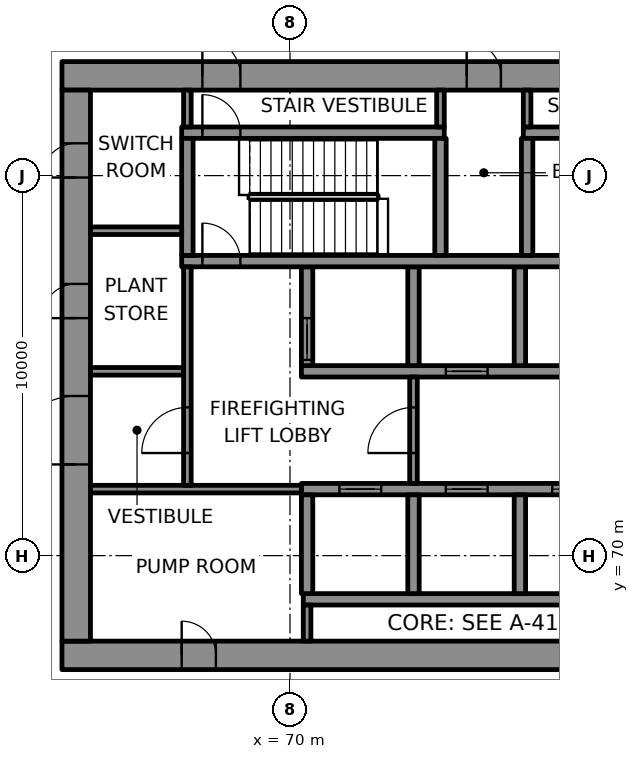
"""IFC4 building model, lengths in metres.
Left out: names, types, materials, properties, quantities, classifications, styles, units other than length and angle.
Written with IfcOpenShell. Run it as: python <this file> out.ifc"""

import sys

from ifc_helpers import new_model, si_unit, direction, frame, frame_2d, origin, place, context, subcontext, project, spatial, rectangle, extrude, element, fill, save


model = new_model("IFC4")
c1 = context("Model", 3, precision=1e-05, world=origin(), true_north=direction((0.0, 1.0)))
c2 = subcontext(c1, "Body", "Model", "MODEL_VIEW")
j1 = project(units=[si_unit("LENGTHUNIT", "METRE"), si_unit("PLANEANGLEUNIT", "RADIAN")], contexts=[c1])
p1 = place(None, origin())
s1 = spatial("IfcSite", under=j1, at=p1, CompositionType="ELEMENT")
p2 = place(p1, origin())
s2 = spatial("IfcBuilding", under=s1, at=p2, CompositionType="ELEMENT")
p3 = place(p2, frame((0.0, 0.0, 146.8)))
s3 = spatial("IfcBuildingStorey", under=s2, at=p3, CompositionType="ELEMENT", Elevation=146.8)
p4 = place(p3, frame((64.0, 67.375, 0.0), z_axis=(0.0, 0.0, 1.0), x_axis=(1.0, 0.0, 0.0)))
e1 = element("IfcWall", 1, at=p4, inside=s3, PredefinedType="SHEAR", context=c2, shape_type="SweptSolid", body=[
    extrude(rectangle(XDim=22.0, YDim=0.75, at=frame_2d((11.0, 0.0))), origin(), (0.0, 0.0, 1.0), 4.05),
])
p5 = place(p4, frame((3.15, 0.0, 0.0)))
e2 = element("IfcOpeningElement", 2, at=p5, cuts=e1, PredefinedType="OPENING", context=c2, shape_type="SweptSolid", body=[
    extrude(rectangle(XDim=0.9, YDim=2.1, at=frame_2d((0.45, 1.05))), frame((0.0, 0.385, 0.0), z_axis=(0.0, -1.0, 0.0), x_axis=(1.0, 0.0, 0.0)), (0.0, 0.0, 1.0), 0.77),
])
p6 = place(p3, frame((64.0, 82.625, 0.0), z_axis=(0.0, 0.0, 1.0), x_axis=(1.0, 0.0, 0.0)))
e3 = element("IfcWall", 3, at=p6, inside=s3, PredefinedType="SHEAR", context=c2, shape_type="SweptSolid", body=[
    extrude(rectangle(XDim=22.0, YDim=0.75, at=frame_2d((11.0, 0.0))), origin(), (0.0, 0.0, 1.0), 4.05),
])
p7 = place(p6, frame((3.695, 0.0, 0.0)))
e4 = element("IfcOpeningElement", 4, at=p7, cuts=e3, PredefinedType="OPENING", context=c2, shape_type="SweptSolid", body=[
    extrude(rectangle(XDim=1.0, YDim=2.1, at=frame_2d((0.5, 1.05))), frame((0.0, 0.385, 0.0), z_axis=(0.0, -1.0, 0.0), x_axis=(1.0, 0.0, 0.0)), (0.0, 0.0, 1.0), 0.77),
])
p8 = place(p6, frame((17.505, 0.0, 0.0)))
e5 = element("IfcOpeningElement", 5, at=p8, cuts=e3, PredefinedType="OPENING", context=c2, shape_type="SweptSolid", body=[
    extrude(rectangle(XDim=1.0, YDim=2.1, at=frame_2d((0.5, 1.05))), frame((0.0, 0.385, 0.0), z_axis=(0.0, -1.0, 0.0), x_axis=(1.0, 0.0, 0.0)), (0.0, 0.0, 1.0), 0.77),
])
p9 = place(p6, frame((10.65, 0.0, 0.0)))
e6 = element("IfcOpeningElement", 6, at=p9, cuts=e3, PredefinedType="OPENING", context=c2, shape_type="SweptSolid", body=[
    extrude(rectangle(XDim=0.9, YDim=2.1, at=frame_2d((0.45, 1.05))), frame((0.0, 0.385, 0.0), z_axis=(0.0, -1.0, 0.0), x_axis=(1.0, 0.0, 0.0)), (0.0, 0.0, 1.0), 0.77),
])
p10 = place(p3, frame((64.375, 67.75, 0.0), z_axis=(0.0, 0.0, 1.0), x_axis=(0.0, 1.0, 0.0)))
e7 = element("IfcWall", 7, at=p10, inside=s3, PredefinedType="SHEAR", context=c2, shape_type="SweptSolid", body=[
    extrude(rectangle(XDim=14.5, YDim=0.75, at=frame_2d((7.25, 0.0))), origin(), (0.0, 0.0, 1.0), 4.05),
])
p11 = place(p10, frame((4.65, 0.0, 0.0)))
e8 = element("IfcOpeningElement", 8, at=p11, cuts=e7, PredefinedType="OPENING", context=c2, shape_type="SweptSolid", body=[
    extrude(rectangle(XDim=1.8, YDim=2.1, at=frame_2d((0.9, 1.05))), frame((0.0, 0.385, 0.0), z_axis=(0.0, -1.0, 0.0), x_axis=(1.0, 0.0, 0.0)), (0.0, 0.0, 1.0), 0.77),
])
p12 = place(p10, frame((8.5, 0.0, 0.0)))
e9 = element("IfcOpeningElement", 9, at=p12, cuts=e7, PredefinedType="OPENING", context=c2, shape_type="SweptSolid", body=[
    extrude(rectangle(XDim=0.9, YDim=2.1, at=frame_2d((0.45, 1.05))), frame((0.0, 0.385, 0.0), z_axis=(0.0, -1.0, 0.0), x_axis=(1.0, 0.0, 0.0)), (0.0, 0.0, 1.0), 0.77),
])
p13 = place(p10, frame((12.2, 0.0, 0.0)))
e10 = element("IfcOpeningElement", 10, at=p13, cuts=e7, PredefinedType="OPENING", context=c2, shape_type="SweptSolid", body=[
    extrude(rectangle(XDim=0.9, YDim=2.1, at=frame_2d((0.45, 1.05))), frame((0.0, 0.385, 0.0), z_axis=(0.0, -1.0, 0.0), x_axis=(1.0, 0.0, 0.0)), (0.0, 0.0, 1.0), 0.77),
])
p14 = place(p3, frame((70.35, 68.85, 0.0), z_axis=(0.0, 0.0, 1.0), x_axis=(1.0, 0.0, 0.0)))
e11 = element("IfcWall", 11, at=p14, inside=s3, PredefinedType="SHEAR", context=c2, shape_type="SweptSolid", body=[
    extrude(rectangle(XDim=14.2, YDim=0.3, at=frame_2d((7.1, 0.0))), origin(), (0.0, 0.0, 1.0), 4.05),
])
p15 = place(p3, frame((70.3, 71.75, 0.0), z_axis=(0.0, 0.0, 1.0), x_axis=(1.0, 0.0, 0.0)))
e12 = element("IfcWall", 12, at=p15, inside=s3, PredefinedType="SHEAR", context=c2, shape_type="SweptSolid", body=[
    extrude(rectangle(XDim=14.3, YDim=0.3, at=frame_2d((7.15, 0.0))), origin(), (0.0, 0.0, 1.0), 4.05),
])
p16 = place(p15, frame((1.0, 0.0, 0.0)))
e13 = element("IfcOpeningElement", 13, at=p16, cuts=e12, PredefinedType="OPENING", context=c2, shape_type="SweptSolid", body=[
    extrude(rectangle(XDim=1.1, YDim=2.1, at=frame_2d((0.55, 1.05))), frame((0.0, 0.16, 0.0), z_axis=(0.0, -1.0, 0.0), x_axis=(1.0, 0.0, 0.0)), (0.0, 0.0, 1.0), 0.32),
])
p17 = place(p15, frame((3.8, 0.0, 0.0)))
e14 = element("IfcOpeningElement", 14, at=p17, cuts=e12, PredefinedType="OPENING", context=c2, shape_type="SweptSolid", body=[
    extrude(rectangle(XDim=1.1, YDim=2.1, at=frame_2d((0.55, 1.05))), frame((0.0, 0.16, 0.0), z_axis=(0.0, -1.0, 0.0), x_axis=(1.0, 0.0, 0.0)), (0.0, 0.0, 1.0), 0.32),
])
p18 = place(p15, frame((6.6, 0.0, 0.0)))
e15 = element("IfcOpeningElement", 15, at=p18, cuts=e12, PredefinedType="OPENING", context=c2, shape_type="SweptSolid", body=[
    extrude(rectangle(XDim=1.1, YDim=2.1, at=frame_2d((0.55, 1.05))), frame((0.0, 0.16, 0.0), z_axis=(0.0, -1.0, 0.0), x_axis=(1.0, 0.0, 0.0)), (0.0, 0.0, 1.0), 0.32),
])
p19 = place(p15, frame((9.4, 0.0, 0.0)))
e16 = element("IfcOpeningElement", 16, at=p19, cuts=e12, PredefinedType="OPENING", context=c2, shape_type="SweptSolid", body=[
    extrude(rectangle(XDim=1.1, YDim=2.1, at=frame_2d((0.55, 1.05))), frame((0.0, 0.16, 0.0), z_axis=(0.0, -1.0, 0.0), x_axis=(1.0, 0.0, 0.0)), (0.0, 0.0, 1.0), 0.32),
])
p20 = place(p15, frame((12.2, 0.0, 0.0)))
e17 = element("IfcOpeningElement", 17, at=p20, cuts=e12, PredefinedType="OPENING", context=c2, shape_type="SweptSolid", body=[
    extrude(rectangle(XDim=1.1, YDim=2.1, at=frame_2d((0.55, 1.05))), frame((0.0, 0.16, 0.0), z_axis=(0.0, -1.0, 0.0), x_axis=(1.0, 0.0, 0.0)), (0.0, 0.0, 1.0), 0.32),
])
p21 = place(p3, frame((70.3, 74.85, 0.0), z_axis=(0.0, 0.0, 1.0), x_axis=(1.0, 0.0, 0.0)))
e18 = element("IfcWall", 18, at=p21, inside=s3, PredefinedType="SHEAR", context=c2, shape_type="SweptSolid", body=[
    extrude(rectangle(XDim=14.3, YDim=0.3, at=frame_2d((7.15, 0.0))), origin(), (0.0, 0.0, 1.0), 4.05),
])
p22 = place(p21, frame((3.8, 0.0, 0.0)))
e19 = element("IfcOpeningElement", 19, at=p22, cuts=e18, PredefinedType="OPENING", context=c2, shape_type="SweptSolid", body=[
    extrude(rectangle(XDim=1.1, YDim=2.1, at=frame_2d((0.55, 1.05))), frame((0.0, 0.16, 0.0), z_axis=(0.0, -1.0, 0.0), x_axis=(1.0, 0.0, 0.0)), (0.0, 0.0, 1.0), 0.32),
])
p23 = place(p21, frame((12.2, 0.0, 0.0)))
e20 = element("IfcOpeningElement", 20, at=p23, cuts=e18, PredefinedType="OPENING", context=c2, shape_type="SweptSolid", body=[
    extrude(rectangle(XDim=1.1, YDim=2.1, at=frame_2d((0.55, 1.05))), frame((0.0, 0.16, 0.0), z_axis=(0.0, -1.0, 0.0), x_axis=(1.0, 0.0, 0.0)), (0.0, 0.0, 1.0), 0.32),
])
p24 = place(p3, frame((70.45, 69.0, 0.0), z_axis=(0.0, 0.0, 1.0), x_axis=(0.0, 1.0, 0.0)))
e21 = element("IfcWall", 21, at=p24, inside=s3, PredefinedType="SHEAR", context=c2, shape_type="SweptSolid", body=[
    extrude(rectangle(XDim=2.6, YDim=0.3, at=frame_2d((1.3, 0.0))), origin(), (0.0, 0.0, 1.0), 4.05),
])
p25 = place(p3, frame((70.45, 75.0, 0.0), z_axis=(0.0, 0.0, 1.0), x_axis=(0.0, 1.0, 0.0)))
e22 = element("IfcWall", 22, at=p25, inside=s3, PredefinedType="SHEAR", context=c2, shape_type="SweptSolid", body=[
    extrude(rectangle(XDim=2.6, YDim=0.3, at=frame_2d((1.3, 0.0))), origin(), (0.0, 0.0, 1.0), 4.05),
])
p26 = place(p25, frame((0.15, 0.0, 0.0)))
e23 = element("IfcOpeningElement", 23, at=p26, cuts=e22, PredefinedType="OPENING", context=c2, shape_type="SweptSolid", body=[
    extrude(rectangle(XDim=1.1, YDim=2.1, at=frame_2d((0.55, 1.05))), frame((0.0, 0.16, 0.0), z_axis=(0.0, -1.0, 0.0), x_axis=(1.0, 0.0, 0.0)), (0.0, 0.0, 1.0), 0.32),
])
for number, where, z_axis, x_axis in (
    (24, (73.25, 69.0, 0.0), (0.0, 0.0, 1.0), (0.0, 1.0, 0.0)),
    (25, (73.25, 75.0, 0.0), (0.0, 0.0, 1.0), (0.0, 1.0, 0.0)),
    (26, (76.05, 69.0, 0.0), (0.0, 0.0, 1.0), (0.0, 1.0, 0.0)),
    (27, (76.05, 75.0, 0.0), (0.0, 0.0, 1.0), (0.0, 1.0, 0.0)),
):
    element("IfcWall", number, at=place(p3, frame(where, z_axis=z_axis, x_axis=x_axis)), inside=s3, PredefinedType="SHEAR", context=c2, shape_type="SweptSolid", body=[
        extrude(rectangle(XDim=2.6, YDim=0.3, at=frame_2d((1.3, 0.0))), origin(), (0.0, 0.0, 1.0), 4.05),
    ])
p27 = place(p3, frame((67.15, 77.75, 0.0), z_axis=(0.0, 0.0, 1.0), x_axis=(1.0, 0.0, 0.0)))
e28 = element("IfcWall", 28, at=p27, inside=s3, PredefinedType="SHEAR", context=c2, shape_type="SweptSolid", body=[
    extrude(rectangle(XDim=17.45, YDim=0.3, at=frame_2d((8.725, 0.0))), origin(), (0.0, 0.0, 1.0), 4.05),
])
p28 = place(p27, frame((0.545, 0.0, 0.0)))
e29 = element("IfcOpeningElement", 29, at=p28, cuts=e28, PredefinedType="OPENING", context=c2, shape_type="SweptSolid", body=[
    extrude(rectangle(XDim=1.0, YDim=2.1, at=frame_2d((0.5, 1.05))), frame((0.0, 0.16, 0.0), z_axis=(0.0, -1.0, 0.0), x_axis=(1.0, 0.0, 0.0)), (0.0, 0.0, 1.0), 0.32),
])
p29 = place(p3, frame((67.15, 81.13, 0.0), z_axis=(0.0, 0.0, 1.0), x_axis=(1.0, 0.0, 0.0)))
e30 = element("IfcWall", 30, at=p29, inside=s3, PredefinedType="SHEAR", context=c2, shape_type="SweptSolid", body=[
    extrude(rectangle(XDim=6.91, YDim=0.3, at=frame_2d((3.455, 0.0))), origin(), (0.0, 0.0, 1.0), 4.05),
])
p30 = place(p29, frame((0.545, 0.0, 0.0)))
e31 = element("IfcOpeningElement", 31, at=p30, cuts=e30, PredefinedType="OPENING", context=c2, shape_type="SweptSolid", body=[
    extrude(rectangle(XDim=1.0, YDim=2.1, at=frame_2d((0.5, 1.05))), frame((0.0, 0.16, 0.0), z_axis=(0.0, -1.0, 0.0), x_axis=(1.0, 0.0, 0.0)), (0.0, 0.0, 1.0), 0.32),
])
p31 = place(p3, frame((76.14, 81.13, 0.0), z_axis=(0.0, 0.0, 1.0), x_axis=(1.0, 0.0, 0.0)))
e32 = element("IfcWall", 32, at=p31, inside=s3, PredefinedType="SHEAR", context=c2, shape_type="SweptSolid", body=[
    extrude(rectangle(XDim=6.86, YDim=0.3, at=frame_2d((3.43, 0.0))), origin(), (0.0, 0.0, 1.0), 4.05),
])
p32 = place(p31, frame((5.365, 0.0, 0.0)))
e33 = element("IfcOpeningElement", 33, at=p32, cuts=e32, PredefinedType="OPENING", context=c2, shape_type="SweptSolid", body=[
    extrude(rectangle(XDim=1.0, YDim=2.1, at=frame_2d((0.5, 1.05))), frame((0.0, 0.16, 0.0), z_axis=(0.0, -1.0, 0.0), x_axis=(1.0, 0.0, 0.0)), (0.0, 0.0, 1.0), 0.32),
])
for number, where, z_axis, x_axis in (
    (34, (67.3, 77.9, 0.0), (0.0, 0.0, 1.0), (0.0, 1.0, 0.0)),
    (35, (73.96, 77.9, 0.0), (0.0, 0.0, 1.0), (0.0, 1.0, 0.0)),
    (36, (76.24, 77.9, 0.0), (0.0, 0.0, 1.0), (0.0, 1.0, 0.0)),
):
    element("IfcWall", number, at=place(p3, frame(where, z_axis=z_axis, x_axis=x_axis)), inside=s3, PredefinedType="SHEAR", context=c2, shape_type="SweptSolid", body=[
        extrude(rectangle(XDim=3.08, YDim=0.3, at=frame_2d((1.54, 0.0))), origin(), (0.0, 0.0, 1.0), 4.05),
    ])
p33 = place(p3, frame((71.348, 108.98, 0.0), z_axis=(0.0, 0.0, 1.0), x_axis=(-0.500000383388, -0.866025182435, 0.0)))
e37 = element("IfcWall", 37, at=p33, inside=s3, PredefinedType="SOLIDWALL", context=c2, shape_type="SweptSolid", body=[
    extrude(rectangle(XDim=55.204, YDim=0.3, at=frame_2d((27.602, 0.0))), origin(), (0.0, 0.0, 1.0), 4.05),
])
p34 = place(p33, frame((16.895, 0.0, 0.8)))
e38 = element("IfcOpeningElement", 38, at=p34, cuts=e37, PredefinedType="OPENING", context=c2, shape_type="SweptSolid", body=[
    extrude(rectangle(XDim=3.0, YDim=2.4, at=frame_2d((1.5, 1.2))), frame((0.0, 0.16, 0.0), z_axis=(0.0, -1.0, 0.0), x_axis=(1.0, 0.0, 0.0)), (0.0, 0.0, 1.0), 0.32),
])
p35 = place(p33, frame((35.309, 0.0, 0.8)))
e39 = element("IfcOpeningElement", 39, at=p35, cuts=e37, PredefinedType="OPENING", context=c2, shape_type="SweptSolid", body=[
    extrude(rectangle(XDim=3.0, YDim=2.4, at=frame_2d((1.5, 1.2))), frame((0.0, 0.16, 0.0), z_axis=(0.0, -1.0, 0.0), x_axis=(1.0, 0.0, 0.0)), (0.0, 0.0, 1.0), 0.32),
])
p36 = place(p3, frame((64.75, 71.75, 0.0), z_axis=(0.0, 0.0, 1.0), x_axis=(1.0, 0.0, 0.0)))
e40 = element("IfcWall", 40, at=p36, inside=s3, PredefinedType="PARTITIONING", context=c2, shape_type="SweptSolid", body=[
    extrude(rectangle(XDim=5.55, YDim=0.2, at=frame_2d((2.775, 0.0))), origin(), (0.0, 0.0, 1.0), 4.05),
])
p37 = place(p3, frame((64.75, 74.85, 0.0), z_axis=(0.0, 0.0, 1.0), x_axis=(1.0, 0.0, 0.0)))
e41 = element("IfcWall", 41, at=p37, inside=s3, PredefinedType="PARTITIONING", context=c2, shape_type="SweptSolid", body=[
    extrude(rectangle(XDim=2.45, YDim=0.2, at=frame_2d((1.225, 0.0))), origin(), (0.0, 0.0, 1.0), 4.05),
])
p38 = place(p3, frame((64.75, 78.55, 0.0), z_axis=(0.0, 0.0, 1.0), x_axis=(1.0, 0.0, 0.0)))
e42 = element("IfcWall", 42, at=p38, inside=s3, PredefinedType="PARTITIONING", context=c2, shape_type="SweptSolid", body=[
    extrude(rectangle(XDim=2.4, YDim=0.2, at=frame_2d((1.2, 0.0))), origin(), (0.0, 0.0, 1.0), 4.05),
])
p39 = place(p3, frame((67.3, 71.85, 0.0), z_axis=(0.0, 0.0, 1.0), x_axis=(0.0, 1.0, 0.0)))
e43 = element("IfcWall", 43, at=p39, inside=s3, PredefinedType="PARTITIONING", context=c2, shape_type="SweptSolid", body=[
    extrude(rectangle(XDim=5.75, YDim=0.2, at=frame_2d((2.875, 0.0))), origin(), (0.0, 0.0, 1.0), 4.05),
])
p40 = place(p39, frame((0.85, 0.0, 0.0)))
e44 = element("IfcOpeningElement", 44, at=p40, cuts=e43, PredefinedType="OPENING", context=c2, shape_type="SweptSolid", body=[
    extrude(rectangle(XDim=1.2, YDim=2.1, at=frame_2d((0.6, 1.05))), frame((0.0, 0.11, 0.0), z_axis=(0.0, -1.0, 0.0), x_axis=(1.0, 0.0, 0.0)), (0.0, 0.0, 1.0), 0.22),
])
p41 = place(p3, frame((67.3, 81.28, 0.0), z_axis=(0.0, 0.0, 1.0), x_axis=(0.0, 1.0, 0.0)))
e45 = element("IfcWall", 45, at=p41, inside=s3, PredefinedType="PARTITIONING", context=c2, shape_type="SweptSolid", body=[
    extrude(rectangle(XDim=0.97, YDim=0.2, at=frame_2d((0.485, 0.0))), origin(), (0.0, 0.0, 1.0), 4.05),
])
p42 = place(p3, frame((70.45, 67.75, 0.0), z_axis=(0.0, 0.0, 1.0), x_axis=(0.0, 1.0, 0.0)))
e46 = element("IfcWall", 46, at=p42, inside=s3, PredefinedType="PARTITIONING", context=c2, shape_type="SweptSolid", body=[
    extrude(rectangle(XDim=0.95, YDim=0.2, at=frame_2d((0.475, 0.0))), origin(), (0.0, 0.0, 1.0), 4.05),
])
p43 = place(p3, frame((73.25, 71.9, 0.0), z_axis=(0.0, 0.0, 1.0), x_axis=(0.0, 1.0, 0.0)))
e47 = element("IfcWall", 47, at=p43, inside=s3, PredefinedType="PARTITIONING", context=c2, shape_type="SweptSolid", body=[
    extrude(rectangle(XDim=2.8, YDim=0.2, at=frame_2d((1.4, 0.0))), origin(), (0.0, 0.0, 1.0), 4.05),
])
p44 = place(p43, frame((0.8, 0.0, 0.0)))
e48 = element("IfcOpeningElement", 48, at=p44, cuts=e47, PredefinedType="OPENING", context=c2, shape_type="SweptSolid", body=[
    extrude(rectangle(XDim=1.2, YDim=2.1, at=frame_2d((0.6, 1.05))), frame((0.0, 0.11, 0.0), z_axis=(0.0, -1.0, 0.0), x_axis=(1.0, 0.0, 0.0)), (0.0, 0.0, 1.0), 0.22),
])
for number, where, z_axis, x_axis in (
    (49, (73.96, 81.28, 0.0), (0.0, 0.0, 1.0), (0.0, 1.0, 0.0)),
    (50, (76.24, 81.28, 0.0), (0.0, 0.0, 1.0), (0.0, 1.0, 0.0)),
):
    element("IfcWall", number, at=place(p3, frame(where, z_axis=z_axis, x_axis=x_axis)), inside=s3, PredefinedType="PARTITIONING", context=c2, shape_type="SweptSolid", body=[
        extrude(rectangle(XDim=0.97, YDim=0.2, at=frame_2d((0.485, 0.0))), origin(), (0.0, 0.0, 1.0), 4.05),
    ])
p45 = place(p16, origin())
e51 = element("IfcDoor", 51, at=p45, inside=s3, OperationType="DOUBLE_DOOR_SLIDING", PredefinedType="DOOR", context=c2, shape_type="SweptSolid", body=[
    extrude(rectangle(XDim=1.1, YDim=2.1, at=frame_2d((0.55, 1.05))), frame((0.0, 0.025, 0.0), z_axis=(0.0, -1.0, 0.0), x_axis=(1.0, 0.0, 0.0)), (0.0, 0.0, 1.0), 0.05),
])
fill(e13, e51)
p46 = place(p17, origin())
e52 = element("IfcDoor", 52, at=p46, inside=s3, OperationType="DOUBLE_DOOR_SLIDING", PredefinedType="DOOR", context=c2, shape_type="SweptSolid", body=[
    extrude(rectangle(XDim=1.1, YDim=2.1, at=frame_2d((0.55, 1.05))), frame((0.0, 0.025, 0.0), z_axis=(0.0, -1.0, 0.0), x_axis=(1.0, 0.0, 0.0)), (0.0, 0.0, 1.0), 0.05),
])
fill(e14, e52)
p47 = place(p18, origin())
e53 = element("IfcDoor", 53, at=p47, inside=s3, OperationType="DOUBLE_DOOR_SLIDING", PredefinedType="DOOR", context=c2, shape_type="SweptSolid", body=[
    extrude(rectangle(XDim=1.1, YDim=2.1, at=frame_2d((0.55, 1.05))), frame((0.0, 0.025, 0.0), z_axis=(0.0, -1.0, 0.0), x_axis=(1.0, 0.0, 0.0)), (0.0, 0.0, 1.0), 0.05),
])
fill(e15, e53)
p48 = place(p26, origin())
e54 = element("IfcDoor", 54, at=p48, inside=s3, OperationType="DOUBLE_DOOR_SLIDING", PredefinedType="DOOR", context=c2, shape_type="SweptSolid", body=[
    extrude(rectangle(XDim=1.1, YDim=2.1, at=frame_2d((0.55, 1.05))), frame((0.0, 0.025, 0.0), z_axis=(0.0, -1.0, 0.0), x_axis=(1.0, 0.0, 0.0)), (0.0, 0.0, 1.0), 0.05),
])
fill(e23, e54)
p49 = place(p22, origin())
e55 = element("IfcDoor", 55, at=p49, inside=s3, OperationType="DOUBLE_DOOR_SLIDING", PredefinedType="DOOR", context=c2, shape_type="SweptSolid", body=[
    extrude(rectangle(XDim=1.1, YDim=2.1, at=frame_2d((0.55, 1.05))), frame((0.0, 0.025, 0.0), z_axis=(0.0, -1.0, 0.0), x_axis=(1.0, 0.0, 0.0)), (0.0, 0.0, 1.0), 0.05),
])
fill(e19, e55)
p50 = place(p28, origin())
e56 = element("IfcDoor", 56, at=p50, inside=s3, OperationType="SINGLE_SWING_LEFT", PredefinedType="DOOR", context=c2, shape_type="SweptSolid", body=[
    extrude(rectangle(XDim=1.0, YDim=2.1, at=frame_2d((0.5, 1.05))), frame((0.0, 0.025, 0.0), z_axis=(0.0, -1.0, 0.0), x_axis=(1.0, 0.0, 0.0)), (0.0, 0.0, 1.0), 0.05),
])
fill(e29, e56)
p51 = place(p30, origin())
e57 = element("IfcDoor", 57, at=p51, inside=s3, OperationType="SINGLE_SWING_RIGHT", PredefinedType="DOOR", context=c2, shape_type="SweptSolid", body=[
    extrude(rectangle(XDim=1.0, YDim=2.1, at=frame_2d((0.5, 1.05))), frame((0.0, 0.025, 0.0), z_axis=(0.0, -1.0, 0.0), x_axis=(1.0, 0.0, 0.0)), (0.0, 0.0, 1.0), 0.05),
])
fill(e31, e57)
p52 = place(p7, origin())
e58 = element("IfcDoor", 58, at=p52, inside=s3, OperationType="SINGLE_SWING_LEFT", PredefinedType="DOOR", context=c2, shape_type="SweptSolid", body=[
    extrude(rectangle(XDim=1.0, YDim=2.1, at=frame_2d((0.5, 1.05))), frame((0.0, 0.095, 0.0), z_axis=(0.0, -1.0, 0.0), x_axis=(1.0, 0.0, 0.0)), (0.0, 0.0, 1.0), 0.19),
])
fill(e4, e58)
p53 = place(p44, origin())
e59 = element("IfcDoor", 59, at=p53, inside=s3, OperationType="SINGLE_SWING_LEFT", PredefinedType="DOOR", context=c2, shape_type="SweptSolid", body=[
    extrude(rectangle(XDim=1.2, YDim=2.1, at=frame_2d((0.6, 1.05))), frame((0.0, 0.025, 0.0), z_axis=(0.0, -1.0, 0.0), x_axis=(1.0, 0.0, 0.0)), (0.0, 0.0, 1.0), 0.05),
])
fill(e48, e59)
p54 = place(p40, origin())
e60 = element("IfcDoor", 60, at=p54, inside=s3, OperationType="SINGLE_SWING_RIGHT", PredefinedType="DOOR", context=c2, shape_type="SweptSolid", body=[
    extrude(rectangle(XDim=1.2, YDim=2.1, at=frame_2d((0.6, 1.05))), frame((0.0, 0.025, 0.0), z_axis=(0.0, -1.0, 0.0), x_axis=(1.0, 0.0, 0.0)), (0.0, 0.0, 1.0), 0.05),
])
fill(e44, e60)
p55 = place(p11, origin())
e61 = element("IfcDoor", 61, at=p55, inside=s3, OperationType="SINGLE_SWING_LEFT", PredefinedType="DOOR", context=c2, shape_type="SweptSolid", body=[
    extrude(rectangle(XDim=1.8, YDim=2.1, at=frame_2d((0.9, 1.05))), frame((0.0, 0.095, 0.0), z_axis=(0.0, -1.0, 0.0), x_axis=(1.0, 0.0, 0.0)), (0.0, 0.0, 1.0), 0.19),
])
fill(e8, e61)
p56 = place(p5, origin())
e62 = element("IfcDoor", 62, at=p56, inside=s3, OperationType="SINGLE_SWING_LEFT", PredefinedType="DOOR", context=c2, shape_type="SweptSolid", body=[
    extrude(rectangle(XDim=0.9, YDim=2.1, at=frame_2d((0.45, 1.05))), frame((0.0, 0.095, 0.0), z_axis=(0.0, -1.0, 0.0), x_axis=(1.0, 0.0, 0.0)), (0.0, 0.0, 1.0), 0.19),
])
fill(e2, e62)
p57 = place(p12, origin())
e63 = element("IfcDoor", 63, at=p57, inside=s3, OperationType="SINGLE_SWING_RIGHT", PredefinedType="DOOR", context=c2, shape_type="SweptSolid", body=[
    extrude(rectangle(XDim=0.9, YDim=2.1, at=frame_2d((0.45, 1.05))), frame((0.0, 0.095, 0.0), z_axis=(0.0, -1.0, 0.0), x_axis=(1.0, 0.0, 0.0)), (0.0, 0.0, 1.0), 0.19),
])
fill(e9, e63)
p58 = place(p13, origin())
e64 = element("IfcDoor", 64, at=p58, inside=s3, OperationType="SINGLE_SWING_LEFT", PredefinedType="DOOR", context=c2, shape_type="SweptSolid", body=[
    extrude(rectangle(XDim=0.9, YDim=2.1, at=frame_2d((0.45, 1.05))), frame((0.0, 0.095, 0.0), z_axis=(0.0, -1.0, 0.0), x_axis=(1.0, 0.0, 0.0)), (0.0, 0.0, 1.0), 0.19),
])
fill(e10, e64)
p59 = place(p9, origin())
e65 = element("IfcDoor", 65, at=p59, inside=s3, OperationType="SINGLE_SWING_RIGHT", PredefinedType="DOOR", context=c2, shape_type="SweptSolid", body=[
    extrude(rectangle(XDim=0.9, YDim=2.1, at=frame_2d((0.45, 1.05))), frame((0.0, 0.095, 0.0), z_axis=(0.0, -1.0, 0.0), x_axis=(1.0, 0.0, 0.0)), (0.0, 0.0, 1.0), 0.19),
])
fill(e6, e65)
save(model, sys.argv[1])
